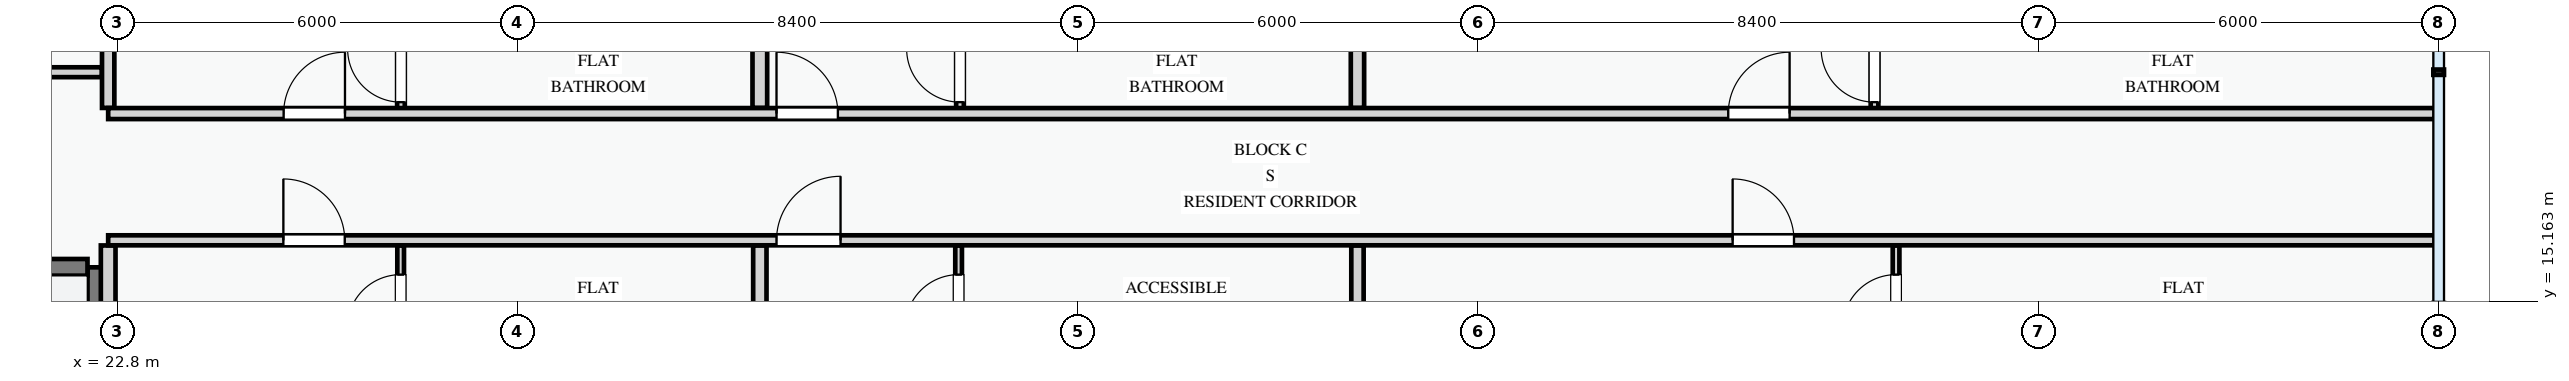
"""IFC4 building model, lengths in metres.
Left out: names, types, materials, properties, quantities, classifications, styles, units other than length and angle.
Written with IfcOpenShell. Run it as: python <this file> out.ifc"""

import sys

from ifc_helpers import new_model, si_unit, direction, frame, frame_2d, origin, place, context, subcontext, project, spatial, rectangle, extrude, element, fill, save


model = new_model("IFC4")
c1 = context("Model", 3, precision=1e-05, world=origin(), true_north=direction((0.0, 1.0)))
c2 = subcontext(c1, "Body", "Model", "MODEL_VIEW")
j1 = project(units=[si_unit("LENGTHUNIT", "METRE"), si_unit("PLANEANGLEUNIT", "RADIAN")], contexts=[c1])
p1 = place(None, origin())
s1 = spatial("IfcSite", under=j1, at=p1, CompositionType="ELEMENT")
p2 = place(p1, origin())
s2 = spatial("IfcBuilding", under=s1, at=p2, CompositionType="ELEMENT")
p3 = place(p2, frame((0.0, 0.0, 24.6)))
s3 = spatial("IfcBuildingStorey", under=s2, at=p3, CompositionType="ELEMENT", Elevation=24.6)
p4 = place(p3, frame((22.475, 8.75, 0.0), z_axis=(0.0, 0.0, 1.0), x_axis=(0.0, 1.0, 0.0)))
e1 = element("IfcWall", 1, at=p4, inside=s3, PredefinedType="SHEAR", context=c2, shape_type="SweptSolid", body=[
    extrude(rectangle(XDim=6.925, YDim=0.25, at=frame_2d((3.462, 0.0))), origin(), (0.0, 0.0, 1.0), 3.0),
])
p5 = place(p3, frame((8.85, 15.675, 0.0), z_axis=(0.0, 0.0, 1.0), x_axis=(1.0, 0.0, 0.0)))
e2 = element("IfcWall", 2, at=p5, inside=s3, PredefinedType="SHEAR", context=c2, shape_type="SweptSolid", body=[
    extrude(rectangle(XDim=13.5, YDim=0.25, at=frame_2d((6.75, 0.0))), origin(), (0.0, 0.0, 1.0), 3.0),
])
p6 = place(p5, frame((6.2, 0.0, 0.0)))
e3 = element("IfcOpeningElement", 3, at=p6, cuts=e2, PredefinedType="OPENING", context=c2, shape_type="SweptSolid", body=[
    extrude(rectangle(XDim=1.1, YDim=2.15, at=frame_2d((0.55, 1.075))), frame((0.0, 0.135, 0.0), z_axis=(0.0, -1.0, 0.0), x_axis=(1.0, 0.0, 0.0)), (0.0, 0.0, 1.0), 0.27),
])
p7 = place(p3, frame((18.025, 18.6, 0.0), z_axis=(0.0, 0.0, 1.0), x_axis=(1.0, 0.0, 0.0)))
e4 = element("IfcWall", 4, at=p7, inside=s3, PredefinedType="PARTITIONING", context=c2, shape_type="SweptSolid", body=[
    extrude(rectangle(XDim=4.541, YDim=0.148, at=frame_2d((2.27, 0.0))), origin(), (0.0, 0.0, 1.0), 3.0),
])
p8 = place(p7, frame((1.65, 0.0, 0.0)))
e5 = element("IfcOpeningElement", 5, at=p8, cuts=e4, PredefinedType="OPENING", context=c2, shape_type="SweptSolid", body=[
    extrude(rectangle(XDim=1.0, YDim=2.15, at=frame_2d((0.5, 1.075))), frame((0.0, 0.084, 0.0), z_axis=(0.0, -1.0, 0.0), x_axis=(1.0, 0.0, 0.0)), (0.0, 0.0, 1.0), 0.168),
])
p9 = place(p3, frame((27.045, 8.54, 0.0), z_axis=(0.0, 0.0, 1.0), x_axis=(0.0, 1.0, 0.0)))
e6 = element("IfcWall", 6, at=p9, inside=s3, PredefinedType="PARTITIONING", context=c2, shape_type="SweptSolid", body=[
    extrude(rectangle(XDim=7.463, YDim=0.1, at=frame_2d((3.732, 0.0))), origin(), (0.0, 0.0, 1.0), 3.0),
])
p10 = place(p9, frame((1.324, 0.0, 0.0)))
e7 = element("IfcOpeningElement", 7, at=p10, cuts=e6, PredefinedType="OPENING", context=c2, shape_type="SweptSolid", body=[
    extrude(rectangle(XDim=0.85, YDim=2.1, at=frame_2d((0.425, 1.05))), frame((0.0, 0.06, 0.0), z_axis=(0.0, -1.0, 0.0), x_axis=(1.0, 0.0, 0.0)), (0.0, 0.0, 1.0), 0.12),
])
p11 = place(p9, frame((4.22, 0.0, 0.0)))
e8 = element("IfcOpeningElement", 8, at=p11, cuts=e6, PredefinedType="OPENING", context=c2, shape_type="SweptSolid", body=[
    extrude(rectangle(XDim=0.85, YDim=2.1, at=frame_2d((0.425, 1.05))), frame((0.0, 0.06, 0.0), z_axis=(0.0, -1.0, 0.0), x_axis=(1.0, 0.0, 0.0)), (0.0, 0.0, 1.0), 0.12),
])
p12 = place(p9, frame((6.226, 0.0, 0.0)))
e9 = element("IfcOpeningElement", 9, at=p12, cuts=e6, PredefinedType="OPENING", context=c2, shape_type="SweptSolid", body=[
    extrude(rectangle(XDim=0.8, YDim=2.1, at=frame_2d((0.4, 1.05))), frame((0.0, 0.06, 0.0), z_axis=(0.0, -1.0, 0.0), x_axis=(1.0, 0.0, 0.0)), (0.0, 0.0, 1.0), 0.12),
])
p13 = place(p3, frame((27.05, 17.98, 0.0), z_axis=(0.0, 0.0, 1.0), x_axis=(0.0, 1.0, 0.0)))
e10 = element("IfcWall", 10, at=p13, inside=s3, PredefinedType="PARTITIONING", context=c2, shape_type="SweptSolid", body=[
    extrude(rectangle(XDim=4.68, YDim=0.115, at=frame_2d((2.34, 0.0))), origin(), (0.0, 0.0, 1.0), 3.0),
])
p14 = place(p13, frame((0.171, 0.0, 0.0)))
e11 = element("IfcOpeningElement", 11, at=p14, cuts=e10, PredefinedType="OPENING", context=c2, shape_type="SweptSolid", body=[
    extrude(rectangle(XDim=0.8, YDim=2.1, at=frame_2d((0.4, 1.05))), frame((0.0, 0.067, 0.0), z_axis=(0.0, -1.0, 0.0), x_axis=(1.0, 0.0, 0.0)), (0.0, 0.0, 1.0), 0.135),
])
p15 = place(p13, frame((1.384, 0.0, 0.0)))
e12 = element("IfcOpeningElement", 12, at=p15, cuts=e10, PredefinedType="OPENING", context=c2, shape_type="SweptSolid", body=[
    extrude(rectangle(XDim=0.85, YDim=2.1, at=frame_2d((0.425, 1.05))), frame((0.0, 0.067, 0.0), z_axis=(0.0, -1.0, 0.0), x_axis=(1.0, 0.0, 0.0)), (0.0, 0.0, 1.0), 0.135),
])
p16 = place(p13, frame((3.193, 0.0, 0.0)))
e13 = element("IfcOpeningElement", 13, at=p16, cuts=e10, PredefinedType="OPENING", context=c2, shape_type="SweptSolid", body=[
    extrude(rectangle(XDim=0.85, YDim=2.1, at=frame_2d((0.425, 1.05))), frame((0.0, 0.067, 0.0), z_axis=(0.0, -1.0, 0.0), x_axis=(1.0, 0.0, 0.0)), (0.0, 0.0, 1.0), 0.135),
])
p17 = place(p3, frame((22.66, 8.54, 0.0), z_axis=(0.0, 0.0, 1.0), x_axis=(0.0, 1.0, 0.0)))
e14 = element("IfcWall", 14, at=p17, inside=s3, PredefinedType="PARTITIONING", context=c2, shape_type="SweptSolid", body=[
    extrude(rectangle(XDim=7.463, YDim=0.22, at=frame_2d((3.732, 0.0))), origin(), (0.0, 0.0, 1.0), 2.425),
])
p18 = place(p3, frame((22.66, 18.064, 0.0), z_axis=(0.0, 0.0, 1.0), x_axis=(0.0, 1.0, 0.0)))
e15 = element("IfcWall", 15, at=p18, inside=s3, PredefinedType="PARTITIONING", context=c2, shape_type="SweptSolid", body=[
    extrude(rectangle(XDim=4.676, YDim=0.185, at=frame_2d((2.338, 0.0))), origin(), (0.0, 0.0, 1.0), 2.425),
])
p19 = place(p3, frame((35.41, 8.54, 0.0), z_axis=(0.0, 0.0, 1.0), x_axis=(0.0, 1.0, 0.0)))
e16 = element("IfcWall", 16, at=p19, inside=s3, PredefinedType="PARTITIONING", context=c2, shape_type="SweptSolid", body=[
    extrude(rectangle(XDim=7.463, YDim=0.1, at=frame_2d((3.732, 0.0))), origin(), (0.0, 0.0, 1.0), 3.0),
])
p20 = place(p19, frame((1.324, 0.0, 0.0)))
e17 = element("IfcOpeningElement", 17, at=p20, cuts=e16, PredefinedType="OPENING", context=c2, shape_type="SweptSolid", body=[
    extrude(rectangle(XDim=0.82, YDim=2.08, at=frame_2d((0.41, 1.04))), frame((0.0, 0.06, 0.0), z_axis=(0.0, -1.0, 0.0), x_axis=(1.0, 0.0, 0.0)), (0.0, 0.0, 1.0), 0.12),
])
p21 = place(p19, frame((4.22, 0.0, 0.0)))
e18 = element("IfcOpeningElement", 18, at=p21, cuts=e16, PredefinedType="OPENING", context=c2, shape_type="SweptSolid", body=[
    extrude(rectangle(XDim=0.85, YDim=2.1, at=frame_2d((0.425, 1.05))), frame((0.0, 0.06, 0.0), z_axis=(0.0, -1.0, 0.0), x_axis=(1.0, 0.0, 0.0)), (0.0, 0.0, 1.0), 0.12),
])
p22 = place(p19, frame((6.226, 0.0, 0.0)))
e19 = element("IfcOpeningElement", 19, at=p22, cuts=e16, PredefinedType="OPENING", context=c2, shape_type="SweptSolid", body=[
    extrude(rectangle(XDim=0.8, YDim=2.1, at=frame_2d((0.4, 1.05))), frame((0.0, 0.06, 0.0), z_axis=(0.0, -1.0, 0.0), x_axis=(1.0, 0.0, 0.0)), (0.0, 0.0, 1.0), 0.12),
])
p23 = place(p3, frame((35.431, 17.98, 0.0), z_axis=(0.0, 0.0, 1.0), x_axis=(0.0, 1.0, 0.0)))
e20 = element("IfcWall", 20, at=p23, inside=s3, PredefinedType="PARTITIONING", context=c2, shape_type="SweptSolid", body=[
    extrude(rectangle(XDim=4.68, YDim=0.115, at=frame_2d((2.34, 0.0))), origin(), (0.0, 0.0, 1.0), 3.0),
])
p24 = place(p23, frame((0.171, 0.0, 0.0)))
e21 = element("IfcOpeningElement", 21, at=p24, cuts=e20, PredefinedType="OPENING", context=c2, shape_type="SweptSolid", body=[
    extrude(rectangle(XDim=0.8, YDim=2.1, at=frame_2d((0.4, 1.05))), frame((0.0, 0.067, 0.0), z_axis=(0.0, -1.0, 0.0), x_axis=(1.0, 0.0, 0.0)), (0.0, 0.0, 1.0), 0.135),
])
p25 = place(p23, frame((1.384, 0.0, 0.0)))
e22 = element("IfcOpeningElement", 22, at=p25, cuts=e20, PredefinedType="OPENING", context=c2, shape_type="SweptSolid", body=[
    extrude(rectangle(XDim=0.82, YDim=2.08, at=frame_2d((0.41, 1.04))), frame((0.0, 0.067, 0.0), z_axis=(0.0, -1.0, 0.0), x_axis=(1.0, 0.0, 0.0)), (0.0, 0.0, 1.0), 0.135),
])
p26 = place(p23, frame((3.193, 0.0, 0.0)))
e23 = element("IfcOpeningElement", 23, at=p26, cuts=e20, PredefinedType="OPENING", context=c2, shape_type="SweptSolid", body=[
    extrude(rectangle(XDim=0.85, YDim=2.1, at=frame_2d((0.425, 1.05))), frame((0.0, 0.067, 0.0), z_axis=(0.0, -1.0, 0.0), x_axis=(1.0, 0.0, 0.0)), (0.0, 0.0, 1.0), 0.135),
])
p27 = place(p3, frame((32.43, 8.54, 0.0), z_axis=(0.0, 0.0, 1.0), x_axis=(0.0, 1.0, 0.0)))
e24 = element("IfcWall", 24, at=p27, inside=s3, PredefinedType="PARTITIONING", context=c2, shape_type="SweptSolid", body=[
    extrude(rectangle(XDim=7.463, YDim=0.2, at=frame_2d((3.732, 0.0))), origin(), (0.0, 0.0, 1.0), 3.0),
])
p28 = place(p3, frame((32.43, 18.064, 0.0), z_axis=(0.0, 0.0, 1.0), x_axis=(0.0, 1.0, 0.0)))
e25 = element("IfcWall", 25, at=p28, inside=s3, PredefinedType="PARTITIONING", context=c2, shape_type="SweptSolid", body=[
    extrude(rectangle(XDim=4.596, YDim=0.22, at=frame_2d((2.298, 0.0))), origin(), (0.0, 0.0, 1.0), 3.0),
])
p29 = place(p3, frame((49.465, 8.54, 0.0), z_axis=(0.0, 0.0, 1.0), x_axis=(0.0, 1.0, 0.0)))
e26 = element("IfcWall", 26, at=p29, inside=s3, PredefinedType="PARTITIONING", context=c2, shape_type="SweptSolid", body=[
    extrude(rectangle(XDim=7.463, YDim=0.1, at=frame_2d((3.732, 0.0))), origin(), (0.0, 0.0, 1.0), 3.0),
])
p30 = place(p29, frame((1.324, 0.0, 0.0)))
e27 = element("IfcOpeningElement", 27, at=p30, cuts=e26, PredefinedType="OPENING", context=c2, shape_type="SweptSolid", body=[
    extrude(rectangle(XDim=0.85, YDim=2.1, at=frame_2d((0.425, 1.05))), frame((0.0, 0.06, 0.0), z_axis=(0.0, -1.0, 0.0), x_axis=(1.0, 0.0, 0.0)), (0.0, 0.0, 1.0), 0.12),
])
p31 = place(p29, frame((4.22, 0.0, 0.0)))
e28 = element("IfcOpeningElement", 28, at=p31, cuts=e26, PredefinedType="OPENING", context=c2, shape_type="SweptSolid", body=[
    extrude(rectangle(XDim=0.85, YDim=2.1, at=frame_2d((0.425, 1.05))), frame((0.0, 0.06, 0.0), z_axis=(0.0, -1.0, 0.0), x_axis=(1.0, 0.0, 0.0)), (0.0, 0.0, 1.0), 0.12),
])
p32 = place(p29, frame((6.226, 0.0, 0.0)))
e29 = element("IfcOpeningElement", 29, at=p32, cuts=e26, PredefinedType="OPENING", context=c2, shape_type="SweptSolid", body=[
    extrude(rectangle(XDim=0.8, YDim=2.1, at=frame_2d((0.4, 1.05))), frame((0.0, 0.06, 0.0), z_axis=(0.0, -1.0, 0.0), x_axis=(1.0, 0.0, 0.0)), (0.0, 0.0, 1.0), 0.12),
])
p33 = place(p3, frame((49.142, 17.98, 0.0), z_axis=(0.0, 0.0, 1.0), x_axis=(0.0, 1.0, 0.0)))
e30 = element("IfcWall", 30, at=p33, inside=s3, PredefinedType="PARTITIONING", context=c2, shape_type="SweptSolid", body=[
    extrude(rectangle(XDim=4.76, YDim=0.115, at=frame_2d((2.38, 0.0))), origin(), (0.0, 0.0, 1.0), 3.0),
])
p34 = place(p33, frame((0.171, 0.0, 0.0)))
e31 = element("IfcOpeningElement", 31, at=p34, cuts=e30, PredefinedType="OPENING", context=c2, shape_type="SweptSolid", body=[
    extrude(rectangle(XDim=0.8, YDim=2.1, at=frame_2d((0.4, 1.05))), frame((0.0, 0.067, 0.0), z_axis=(0.0, -1.0, 0.0), x_axis=(1.0, 0.0, 0.0)), (0.0, 0.0, 1.0), 0.135),
])
p35 = place(p33, frame((1.384, 0.0, 0.0)))
e32 = element("IfcOpeningElement", 32, at=p35, cuts=e30, PredefinedType="OPENING", context=c2, shape_type="SweptSolid", body=[
    extrude(rectangle(XDim=0.85, YDim=2.1, at=frame_2d((0.425, 1.05))), frame((0.0, 0.067, 0.0), z_axis=(0.0, -1.0, 0.0), x_axis=(1.0, 0.0, 0.0)), (0.0, 0.0, 1.0), 0.135),
])
p36 = place(p33, frame((3.193, 0.0, 0.0)))
e33 = element("IfcOpeningElement", 33, at=p36, cuts=e30, PredefinedType="OPENING", context=c2, shape_type="SweptSolid", body=[
    extrude(rectangle(XDim=0.85, YDim=2.1, at=frame_2d((0.425, 1.05))), frame((0.0, 0.067, 0.0), z_axis=(0.0, -1.0, 0.0), x_axis=(1.0, 0.0, 0.0)), (0.0, 0.0, 1.0), 0.135),
])
p37 = place(p3, frame((41.39, 8.54, 0.0), z_axis=(0.0, 0.0, 1.0), x_axis=(0.0, 1.0, 0.0)))
e34 = element("IfcWall", 34, at=p37, inside=s3, PredefinedType="PARTITIONING", context=c2, shape_type="SweptSolid", body=[
    extrude(rectangle(XDim=7.463, YDim=0.185, at=frame_2d((3.732, 0.0))), origin(), (0.0, 0.0, 1.0), 3.0),
])
p38 = place(p3, frame((41.39, 18.064, 0.0), z_axis=(0.0, 0.0, 1.0), x_axis=(0.0, 1.0, 0.0)))
e35 = element("IfcWall", 35, at=p38, inside=s3, PredefinedType="PARTITIONING", context=c2, shape_type="SweptSolid", body=[
    extrude(rectangle(XDim=4.596, YDim=0.2, at=frame_2d((2.298, 0.0))), origin(), (0.0, 0.0, 1.0), 3.0),
])
p39 = place(p3, frame((22.66, 16.08, 0.0), z_axis=(0.0, 0.0, 1.0), x_axis=(1.0, 0.0, 0.0)))
e36 = element("IfcWall", 36, at=p39, inside=s3, PredefinedType="PARTITIONING", context=c2, shape_type="SweptSolid", body=[
    extrude(rectangle(XDim=34.88, YDim=0.15, at=frame_2d((17.44, 0.0))), origin(), (0.0, 0.0, 1.0), 3.0),
])
p40 = place(p39, frame((2.627, 0.0, 0.0)))
e37 = element("IfcOpeningElement", 37, at=p40, cuts=e36, PredefinedType="OPENING", context=c2, shape_type="SweptSolid", body=[
    extrude(rectangle(XDim=0.92, YDim=2.1, at=frame_2d((0.46, 1.05))), frame((0.0, 0.085, 0.0), z_axis=(0.0, -1.0, 0.0), x_axis=(1.0, 0.0, 0.0)), (0.0, 0.0, 1.0), 0.17),
])
p41 = place(p39, frame((10.02, 0.0, 0.0)))
e38 = element("IfcOpeningElement", 38, at=p41, cuts=e36, PredefinedType="OPENING", context=c2, shape_type="SweptSolid", body=[
    extrude(rectangle(XDim=0.96, YDim=2.12, at=frame_2d((0.48, 1.06))), frame((0.0, 0.085, 0.0), z_axis=(0.0, -1.0, 0.0), x_axis=(1.0, 0.0, 0.0)), (0.0, 0.0, 1.0), 0.17),
])
p42 = place(p39, frame((24.355, 0.0, 0.0)))
e39 = element("IfcOpeningElement", 39, at=p42, cuts=e36, PredefinedType="OPENING", context=c2, shape_type="SweptSolid", body=[
    extrude(rectangle(XDim=0.92, YDim=2.1, at=frame_2d((0.46, 1.05))), frame((0.0, 0.085, 0.0), z_axis=(0.0, -1.0, 0.0), x_axis=(1.0, 0.0, 0.0)), (0.0, 0.0, 1.0), 0.17),
])
p43 = place(p3, frame((22.66, 17.98, 0.0), z_axis=(0.0, 0.0, 1.0), x_axis=(1.0, 0.0, 0.0)))
e40 = element("IfcWall", 40, at=p43, inside=s3, PredefinedType="PARTITIONING", context=c2, shape_type="SweptSolid", body=[
    extrude(rectangle(XDim=34.88, YDim=0.165, at=frame_2d((17.44, 0.0))), origin(), (0.0, 0.0, 1.0), 3.0),
])
p44 = place(p43, frame((2.63, 0.0, 0.0)))
e41 = element("IfcOpeningElement", 41, at=p44, cuts=e40, PredefinedType="OPENING", context=c2, shape_type="SweptSolid", body=[
    extrude(rectangle(XDim=0.92, YDim=2.1, at=frame_2d((0.46, 1.05))), frame((0.0, 0.093, 0.0), z_axis=(0.0, -1.0, 0.0), x_axis=(1.0, 0.0, 0.0)), (0.0, 0.0, 1.0), 0.185),
])
p45 = place(p43, frame((10.02, 0.0, 0.0)))
e42 = element("IfcOpeningElement", 42, at=p45, cuts=e40, PredefinedType="OPENING", context=c2, shape_type="SweptSolid", body=[
    extrude(rectangle(XDim=0.92, YDim=2.1, at=frame_2d((0.46, 1.05))), frame((0.0, 0.093, 0.0), z_axis=(0.0, -1.0, 0.0), x_axis=(1.0, 0.0, 0.0)), (0.0, 0.0, 1.0), 0.185),
])
p46 = place(p43, frame((24.289, 0.0, 0.0)))
e43 = element("IfcOpeningElement", 43, at=p46, cuts=e40, PredefinedType="OPENING", context=c2, shape_type="SweptSolid", body=[
    extrude(rectangle(XDim=0.92, YDim=2.1, at=frame_2d((0.46, 1.05))), frame((0.0, 0.093, 0.0), z_axis=(0.0, -1.0, 0.0), x_axis=(1.0, 0.0, 0.0)), (0.0, 0.0, 1.0), 0.185),
])
p47 = place(p12, origin())
e44 = element("IfcDoor", 44, at=p47, inside=s3, OperationType="SINGLE_SWING_LEFT", PredefinedType="DOOR", context=c2, shape_type="SweptSolid", body=[
    extrude(rectangle(XDim=0.8, YDim=2.1, at=frame_2d((0.4, 1.05))), frame((0.0, 0.025, 0.0), z_axis=(0.0, -1.0, 0.0), x_axis=(1.0, 0.0, 0.0)), (0.0, 0.0, 1.0), 0.05),
])
fill(e9, e44)
p48 = place(p14, origin())
e45 = element("IfcDoor", 45, at=p48, inside=s3, OperationType="SINGLE_SWING_RIGHT", PredefinedType="DOOR", context=c2, shape_type="SweptSolid", body=[
    extrude(rectangle(XDim=0.8, YDim=2.1, at=frame_2d((0.4, 1.05))), frame((0.0, 0.025, 0.0), z_axis=(0.0, -1.0, 0.0), x_axis=(1.0, 0.0, 0.0)), (0.0, 0.0, 1.0), 0.05),
])
fill(e11, e45)
p49 = place(p22, origin())
e46 = element("IfcDoor", 46, at=p49, inside=s3, OperationType="SINGLE_SWING_LEFT", PredefinedType="DOOR", context=c2, shape_type="SweptSolid", body=[
    extrude(rectangle(XDim=0.8, YDim=2.1, at=frame_2d((0.4, 1.05))), frame((0.0, 0.025, 0.0), z_axis=(0.0, -1.0, 0.0), x_axis=(1.0, 0.0, 0.0)), (0.0, 0.0, 1.0), 0.05),
])
fill(e19, e46)
p50 = place(p24, origin())
e47 = element("IfcDoor", 47, at=p50, inside=s3, OperationType="SINGLE_SWING_RIGHT", PredefinedType="DOOR", context=c2, shape_type="SweptSolid", body=[
    extrude(rectangle(XDim=0.8, YDim=2.1, at=frame_2d((0.4, 1.05))), frame((0.0, 0.025, 0.0), z_axis=(0.0, -1.0, 0.0), x_axis=(1.0, 0.0, 0.0)), (0.0, 0.0, 1.0), 0.05),
])
fill(e21, e47)
p51 = place(p32, origin())
e48 = element("IfcDoor", 48, at=p51, inside=s3, OperationType="SINGLE_SWING_LEFT", PredefinedType="DOOR", context=c2, shape_type="SweptSolid", body=[
    extrude(rectangle(XDim=0.8, YDim=2.1, at=frame_2d((0.4, 1.05))), frame((0.0, 0.025, 0.0), z_axis=(0.0, -1.0, 0.0), x_axis=(1.0, 0.0, 0.0)), (0.0, 0.0, 1.0), 0.05),
])
fill(e29, e48)
p52 = place(p34, origin())
e49 = element("IfcDoor", 49, at=p52, inside=s3, OperationType="SINGLE_SWING_RIGHT", PredefinedType="DOOR", context=c2, shape_type="SweptSolid", body=[
    extrude(rectangle(XDim=0.8, YDim=2.1, at=frame_2d((0.4, 1.05))), frame((0.0, 0.025, 0.0), z_axis=(0.0, -1.0, 0.0), x_axis=(1.0, 0.0, 0.0)), (0.0, 0.0, 1.0), 0.05),
])
fill(e31, e49)
p53 = place(p40, origin())
e50 = element("IfcDoor", 50, at=p53, inside=s3, OperationType="SINGLE_SWING_LEFT", PredefinedType="DOOR", context=c2, shape_type="SweptSolid", body=[
    extrude(rectangle(XDim=0.92, YDim=2.1, at=frame_2d((0.46, 1.05))), frame((0.0, 0.025, 0.0), z_axis=(0.0, -1.0, 0.0), x_axis=(1.0, 0.0, 0.0)), (0.0, 0.0, 1.0), 0.05),
])
fill(e37, e50)
p54 = place(p41, origin())
e51 = element("IfcDoor", 51, at=p54, inside=s3, OperationType="SINGLE_SWING_RIGHT", PredefinedType="DOOR", context=c2, shape_type="SweptSolid", body=[
    extrude(rectangle(XDim=0.96, YDim=2.12, at=frame_2d((0.48, 1.06))), frame((0.0, 0.025, 0.0), z_axis=(0.0, -1.0, 0.0), x_axis=(1.0, 0.0, 0.0)), (0.0, 0.0, 1.0), 0.05),
])
fill(e38, e51)
p55 = place(p42, origin())
e52 = element("IfcDoor", 52, at=p55, inside=s3, OperationType="SINGLE_SWING_LEFT", PredefinedType="DOOR", context=c2, shape_type="SweptSolid", body=[
    extrude(rectangle(XDim=0.92, YDim=2.1, at=frame_2d((0.46, 1.05))), frame((0.0, 0.025, 0.0), z_axis=(0.0, -1.0, 0.0), x_axis=(1.0, 0.0, 0.0)), (0.0, 0.0, 1.0), 0.05),
])
fill(e39, e52)
p56 = place(p44, origin())
e53 = element("IfcDoor", 53, at=p56, inside=s3, OperationType="SINGLE_SWING_RIGHT", PredefinedType="DOOR", context=c2, shape_type="SweptSolid", body=[
    extrude(rectangle(XDim=0.92, YDim=2.1, at=frame_2d((0.46, 1.05))), frame((0.0, 0.025, 0.0), z_axis=(0.0, -1.0, 0.0), x_axis=(1.0, 0.0, 0.0)), (0.0, 0.0, 1.0), 0.05),
])
fill(e41, e53)
p57 = place(p45, origin())
e54 = element("IfcDoor", 54, at=p57, inside=s3, OperationType="SINGLE_SWING_LEFT", PredefinedType="DOOR", context=c2, shape_type="SweptSolid", body=[
    extrude(rectangle(XDim=0.92, YDim=2.1, at=frame_2d((0.46, 1.05))), frame((0.0, 0.025, 0.0), z_axis=(0.0, -1.0, 0.0), x_axis=(1.0, 0.0, 0.0)), (0.0, 0.0, 1.0), 0.05),
])
fill(e42, e54)
p58 = place(p46, origin())
e55 = element("IfcDoor", 55, at=p58, inside=s3, OperationType="SINGLE_SWING_RIGHT", PredefinedType="DOOR", context=c2, shape_type="SweptSolid", body=[
    extrude(rectangle(XDim=0.92, YDim=2.1, at=frame_2d((0.46, 1.05))), frame((0.0, 0.025, 0.0), z_axis=(0.0, -1.0, 0.0), x_axis=(1.0, 0.0, 0.0)), (0.0, 0.0, 1.0), 0.05),
])
fill(e43, e55)
save(model, sys.argv[1])
